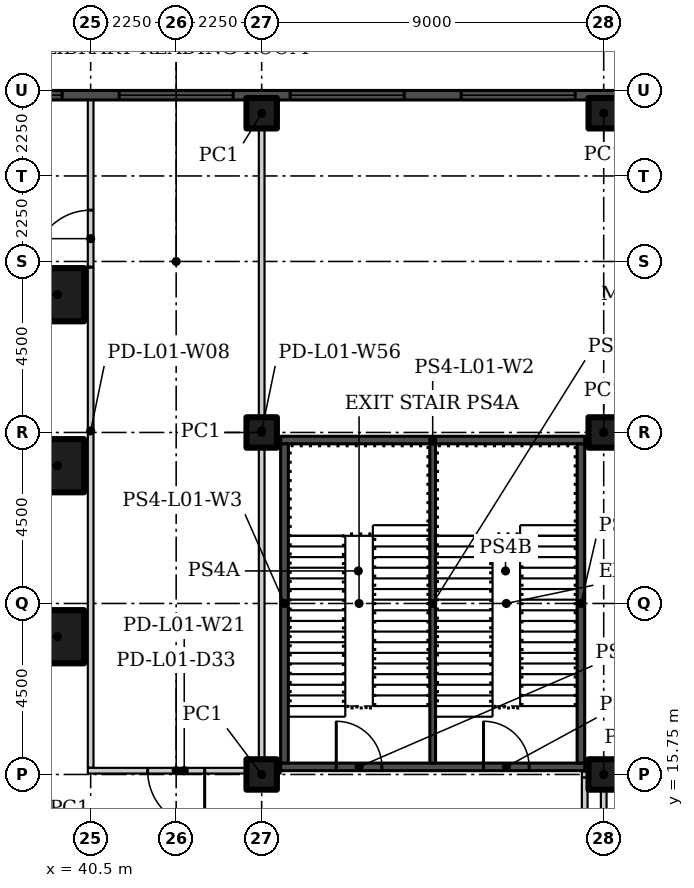
"""IFC4 building model, lengths in metres.
Left out: names, types, materials, properties, quantities, classifications, styles, units other than length and angle.
Written with IfcOpenShell. Run it as: python <this file> out.ifc"""

import sys

from ifc_helpers import new_model, si_unit, direction, frame, frame_2d, origin, origin_2d, place, context, subcontext, project, spatial, rectangle, hollow_rectangle, extrude, element, fill, save


model = new_model("IFC4")
c1 = context("Model", 3, precision=1e-05, world=origin(), true_north=direction((0.0, 1.0)))
c2 = subcontext(c1, "Body", "Model", "MODEL_VIEW")
j1 = project(units=[si_unit("LENGTHUNIT", "METRE"), si_unit("PLANEANGLEUNIT", "RADIAN")], contexts=[c1])
p1 = place(None, origin())
s1 = spatial("IfcSite", under=j1, at=p1, CompositionType="ELEMENT")
p2 = place(p1, origin())
s2 = spatial("IfcBuilding", under=s1, at=p2, CompositionType="ELEMENT")
p3 = place(p2, frame((0.0, 0.0, 6.5)))
s3 = spatial("IfcBuildingStorey", under=s2, at=p3, CompositionType="ELEMENT", Elevation=6.5)
for number, where in (
    (1, (39.625, 19.375, 0.0)),
    (2, (39.625, 23.875, 0.0)),
    (3, (39.625, 28.375, 0.0)),
):
    element("IfcColumn", number, at=place(p3, frame(where)), inside=s3, PredefinedType="COLUMN", context=c2, shape_type="SweptSolid", body=[
        extrude(hollow_rectangle(XDim=1.4, YDim=1.4, WallThickness=0.06, at=origin_2d()), origin(), (0.0, 0.0, 1.0), 5.6),
    ])
for number, where in (
    (4, (45.0, 15.75, 0.0)),
    (5, (45.0, 24.75, 0.0)),
    (6, (45.0, 33.15, 0.0)),
    (7, (54.0, 15.75, 0.0)),
    (8, (54.0, 24.75, 0.0)),
    (9, (54.0, 33.15, 0.0)),
):
    element("IfcColumn", number, at=place(p3, frame(where)), inside=s3, PredefinedType="COLUMN", context=c2, shape_type="SweptSolid", body=[
        extrude(hollow_rectangle(XDim=0.8, YDim=0.8, WallThickness=0.03, at=origin_2d()), origin(), (0.0, 0.0, 1.0), 5.6),
    ])
p4 = place(p3, frame((40.5, 15.925, 0.0), z_axis=(0.0, 0.0, 1.0), x_axis=(0.0, 1.0, 0.0)))
e10 = element("IfcWall", 10, at=p4, inside=s3, PredefinedType="PARTITIONING", context=c2, shape_type="SweptSolid", body=[
    extrude(rectangle(XDim=17.73, YDim=0.15, at=frame_2d((8.865, 0.0))), origin(), (0.0, 0.0, 1.0), 5.6),
])
p5 = place(p4, frame((13.175, 0.0, 0.0)))
e11 = element("IfcOpeningElement", 11, at=p5, cuts=e10, PredefinedType="OPENING", context=c2, shape_type="SweptSolid", body=[
    extrude(rectangle(XDim=1.5, YDim=2.1, at=frame_2d((0.75, 1.05))), frame((0.0, 0.085, 0.0), z_axis=(0.0, -1.0, 0.0), x_axis=(1.0, 0.0, 0.0)), (0.0, 0.0, 1.0), 0.17),
])
p6 = place(p3, frame((45.5, 15.85, 0.0), z_axis=(0.0, 0.0, 1.0), x_axis=(-1.0, 0.0, 0.0)))
e12 = element("IfcWall", 12, at=p6, inside=s3, PredefinedType="PARTITIONING", context=c2, shape_type="SweptSolid", body=[
    extrude(rectangle(XDim=5.075, YDim=0.15, at=frame_2d((2.538, 0.0))), origin(), (0.0, 0.0, 1.0), 5.6),
])
p7 = place(p6, frame((2.0, 0.0, 0.0)))
e13 = element("IfcOpeningElement", 13, at=p7, cuts=e12, PredefinedType="OPENING", context=c2, shape_type="SweptSolid", body=[
    extrude(rectangle(XDim=1.5, YDim=2.1, at=frame_2d((0.75, 1.05))), frame((0.0, 0.085, 0.0), z_axis=(0.0, -1.0, 0.0), x_axis=(1.0, 0.0, 0.0)), (0.0, 0.0, 1.0), 0.17),
])
p8 = place(p3, frame((53.5, 15.675, 0.0), z_axis=(0.0, 0.0, 1.0), x_axis=(0.0, -1.0, 0.0)))
e14 = element("IfcWall", 14, at=p8, inside=s3, PredefinedType="PARTITIONING", context=c2, shape_type="SweptSolid", body=[
    extrude(rectangle(XDim=2.75, YDim=0.15, at=frame_2d((1.375, 0.0))), origin(), (0.0, 0.0, 1.0), 5.6),
])
p9 = place(p3, frame((53.425, 15.75, 0.0)))
e15 = element("IfcWall", 15, at=p9, inside=s3, PredefinedType="PARTITIONING", context=c2, shape_type="SweptSolid", body=[
    extrude(rectangle(XDim=0.65, YDim=0.15, at=frame_2d((0.325, 0.0))), origin(), (0.0, 0.0, 1.0), 5.6),
])
p10 = place(p3, frame((54.0, 15.675, 0.0), z_axis=(0.0, 0.0, 1.0), x_axis=(0.0, -1.0, 0.0)))
e16 = element("IfcWall", 16, at=p10, inside=s3, PredefinedType="PARTITIONING", context=c2, shape_type="SweptSolid", body=[
    extrude(rectangle(XDim=8.85, YDim=0.15, at=frame_2d((4.425, 0.0))), origin(), (0.0, 0.0, 1.0), 5.6),
])
p11 = place(p3, frame((45.0, 33.655, 0.0), z_axis=(0.0, 0.0, 1.0), x_axis=(0.0, -1.0, 0.0)))
e17 = element("IfcWall", 17, at=p11, inside=s3, PredefinedType="PARTITIONING", context=c2, shape_type="SweptSolid", body=[
    extrude(rectangle(XDim=17.73, YDim=0.15, at=frame_2d((8.865, 0.0))), origin(), (0.0, 0.0, 1.0), 5.6),
])
p12 = place(p3, frame((-67.5, 33.625, -0.35)))
e18 = element("IfcWall", 18, at=p12, inside=s3, PredefinedType="SOLIDWALL", context=c2, shape_type="SweptSolid", body=[
    extrude(rectangle(XDim=130.5, YDim=0.25, at=frame_2d((65.25, 0.0))), origin(), (0.0, 0.0, 1.0), 6.0),
])
p13 = place(p12, frame((126.75, 0.0, 1.35)))
e19 = element("IfcOpeningElement", 19, at=p13, cuts=e18, PredefinedType="OPENING", context=c2, shape_type="SweptSolid", body=[
    extrude(rectangle(XDim=3.0, YDim=1.8, at=frame_2d((1.5, 0.9))), frame((0.0, 0.135, 0.0), z_axis=(0.0, -1.0, 0.0), x_axis=(1.0, 0.0, 0.0)), (0.0, 0.0, 1.0), 0.27),
])
p14 = place(p12, frame((122.25, 0.0, 1.35)))
e20 = element("IfcOpeningElement", 20, at=p14, cuts=e18, PredefinedType="OPENING", context=c2, shape_type="SweptSolid", body=[
    extrude(rectangle(XDim=3.0, YDim=1.8, at=frame_2d((1.5, 0.9))), frame((0.0, 0.135, 0.0), z_axis=(0.0, -1.0, 0.0), x_axis=(1.0, 0.0, 0.0)), (0.0, 0.0, 1.0), 0.27),
])
p15 = place(p12, frame((117.75, 0.0, 1.35)))
e21 = element("IfcOpeningElement", 21, at=p15, cuts=e18, PredefinedType="OPENING", context=c2, shape_type="SweptSolid", body=[
    extrude(rectangle(XDim=3.0, YDim=1.8, at=frame_2d((1.5, 0.9))), frame((0.0, 0.135, 0.0), z_axis=(0.0, -1.0, 0.0), x_axis=(1.0, 0.0, 0.0)), (0.0, 0.0, 1.0), 0.27),
])
p16 = place(p12, frame((113.25, 0.0, 1.35)))
e22 = element("IfcOpeningElement", 22, at=p16, cuts=e18, PredefinedType="OPENING", context=c2, shape_type="SweptSolid", body=[
    extrude(rectangle(XDim=3.0, YDim=1.8, at=frame_2d((1.5, 0.9))), frame((0.0, 0.135, 0.0), z_axis=(0.0, -1.0, 0.0), x_axis=(1.0, 0.0, 0.0)), (0.0, 0.0, 1.0), 0.27),
])
p17 = place(p12, frame((108.75, 0.0, 1.35)))
e23 = element("IfcOpeningElement", 23, at=p17, cuts=e18, PredefinedType="OPENING", context=c2, shape_type="SweptSolid", body=[
    extrude(rectangle(XDim=3.0, YDim=1.8, at=frame_2d((1.5, 0.9))), frame((0.0, 0.135, 0.0), z_axis=(0.0, -1.0, 0.0), x_axis=(1.0, 0.0, 0.0)), (0.0, 0.0, 1.0), 0.27),
])
p18 = place(p12, frame((104.25, 0.0, 1.35)))
e24 = element("IfcOpeningElement", 24, at=p18, cuts=e18, PredefinedType="OPENING", context=c2, shape_type="SweptSolid", body=[
    extrude(rectangle(XDim=3.0, YDim=1.8, at=frame_2d((1.5, 0.9))), frame((0.0, 0.135, 0.0), z_axis=(0.0, -1.0, 0.0), x_axis=(1.0, 0.0, 0.0)), (0.0, 0.0, 1.0), 0.27),
])
p19 = place(p12, frame((99.75, 0.0, 1.35)))
e25 = element("IfcOpeningElement", 25, at=p19, cuts=e18, PredefinedType="OPENING", context=c2, shape_type="SweptSolid", body=[
    extrude(rectangle(XDim=3.0, YDim=1.8, at=frame_2d((1.5, 0.9))), frame((0.0, 0.135, 0.0), z_axis=(0.0, -1.0, 0.0), x_axis=(1.0, 0.0, 0.0)), (0.0, 0.0, 1.0), 0.27),
])
p20 = place(p12, frame((95.25, 0.0, 1.35)))
e26 = element("IfcOpeningElement", 26, at=p20, cuts=e18, PredefinedType="OPENING", context=c2, shape_type="SweptSolid", body=[
    extrude(rectangle(XDim=3.0, YDim=1.8, at=frame_2d((1.5, 0.9))), frame((0.0, 0.135, 0.0), z_axis=(0.0, -1.0, 0.0), x_axis=(1.0, 0.0, 0.0)), (0.0, 0.0, 1.0), 0.27),
])
p21 = place(p12, frame((90.75, 0.0, 1.35)))
e27 = element("IfcOpeningElement", 27, at=p21, cuts=e18, PredefinedType="OPENING", context=c2, shape_type="SweptSolid", body=[
    extrude(rectangle(XDim=3.0, YDim=1.8, at=frame_2d((1.5, 0.9))), frame((0.0, 0.135, 0.0), z_axis=(0.0, -1.0, 0.0), x_axis=(1.0, 0.0, 0.0)), (0.0, 0.0, 1.0), 0.27),
])
p22 = place(p12, frame((86.25, 0.0, 1.35)))
e28 = element("IfcOpeningElement", 28, at=p22, cuts=e18, PredefinedType="OPENING", context=c2, shape_type="SweptSolid", body=[
    extrude(rectangle(XDim=3.0, YDim=1.8, at=frame_2d((1.5, 0.9))), frame((0.0, 0.135, 0.0), z_axis=(0.0, -1.0, 0.0), x_axis=(1.0, 0.0, 0.0)), (0.0, 0.0, 1.0), 0.27),
])
p23 = place(p12, frame((81.75, 0.0, 1.35)))
e29 = element("IfcOpeningElement", 29, at=p23, cuts=e18, PredefinedType="OPENING", context=c2, shape_type="SweptSolid", body=[
    extrude(rectangle(XDim=3.0, YDim=1.8, at=frame_2d((1.5, 0.9))), frame((0.0, 0.135, 0.0), z_axis=(0.0, -1.0, 0.0), x_axis=(1.0, 0.0, 0.0)), (0.0, 0.0, 1.0), 0.27),
])
p24 = place(p12, frame((77.25, 0.0, 1.35)))
e30 = element("IfcOpeningElement", 30, at=p24, cuts=e18, PredefinedType="OPENING", context=c2, shape_type="SweptSolid", body=[
    extrude(rectangle(XDim=3.0, YDim=1.8, at=frame_2d((1.5, 0.9))), frame((0.0, 0.135, 0.0), z_axis=(0.0, -1.0, 0.0), x_axis=(1.0, 0.0, 0.0)), (0.0, 0.0, 1.0), 0.27),
])
p25 = place(p12, frame((72.75, 0.0, 1.35)))
e31 = element("IfcOpeningElement", 31, at=p25, cuts=e18, PredefinedType="OPENING", context=c2, shape_type="SweptSolid", body=[
    extrude(rectangle(XDim=3.0, YDim=1.8, at=frame_2d((1.5, 0.9))), frame((0.0, 0.135, 0.0), z_axis=(0.0, -1.0, 0.0), x_axis=(1.0, 0.0, 0.0)), (0.0, 0.0, 1.0), 0.27),
])
p26 = place(p12, frame((68.25, 0.0, 1.35)))
e32 = element("IfcOpeningElement", 32, at=p26, cuts=e18, PredefinedType="OPENING", context=c2, shape_type="SweptSolid", body=[
    extrude(rectangle(XDim=3.0, YDim=1.8, at=frame_2d((1.5, 0.9))), frame((0.0, 0.135, 0.0), z_axis=(0.0, -1.0, 0.0), x_axis=(1.0, 0.0, 0.0)), (0.0, 0.0, 1.0), 0.27),
])
p27 = place(p12, frame((63.75, 0.0, 1.35)))
e33 = element("IfcOpeningElement", 33, at=p27, cuts=e18, PredefinedType="OPENING", context=c2, shape_type="SweptSolid", body=[
    extrude(rectangle(XDim=3.0, YDim=1.8, at=frame_2d((1.5, 0.9))), frame((0.0, 0.135, 0.0), z_axis=(0.0, -1.0, 0.0), x_axis=(1.0, 0.0, 0.0)), (0.0, 0.0, 1.0), 0.27),
])
p28 = place(p12, frame((59.25, 0.0, 1.35)))
e34 = element("IfcOpeningElement", 34, at=p28, cuts=e18, PredefinedType="OPENING", context=c2, shape_type="SweptSolid", body=[
    extrude(rectangle(XDim=3.0, YDim=1.8, at=frame_2d((1.5, 0.9))), frame((0.0, 0.135, 0.0), z_axis=(0.0, -1.0, 0.0), x_axis=(1.0, 0.0, 0.0)), (0.0, 0.0, 1.0), 0.27),
])
p29 = place(p12, frame((54.75, 0.0, 1.35)))
e35 = element("IfcOpeningElement", 35, at=p29, cuts=e18, PredefinedType="OPENING", context=c2, shape_type="SweptSolid", body=[
    extrude(rectangle(XDim=3.0, YDim=1.8, at=frame_2d((1.5, 0.9))), frame((0.0, 0.135, 0.0), z_axis=(0.0, -1.0, 0.0), x_axis=(1.0, 0.0, 0.0)), (0.0, 0.0, 1.0), 0.27),
])
p30 = place(p12, frame((50.25, 0.0, 1.35)))
e36 = element("IfcOpeningElement", 36, at=p30, cuts=e18, PredefinedType="OPENING", context=c2, shape_type="SweptSolid", body=[
    extrude(rectangle(XDim=3.0, YDim=1.8, at=frame_2d((1.5, 0.9))), frame((0.0, 0.135, 0.0), z_axis=(0.0, -1.0, 0.0), x_axis=(1.0, 0.0, 0.0)), (0.0, 0.0, 1.0), 0.27),
])
p31 = place(p12, frame((45.75, 0.0, 1.35)))
e37 = element("IfcOpeningElement", 37, at=p31, cuts=e18, PredefinedType="OPENING", context=c2, shape_type="SweptSolid", body=[
    extrude(rectangle(XDim=3.0, YDim=1.8, at=frame_2d((1.5, 0.9))), frame((0.0, 0.135, 0.0), z_axis=(0.0, -1.0, 0.0), x_axis=(1.0, 0.0, 0.0)), (0.0, 0.0, 1.0), 0.27),
])
p32 = place(p12, frame((41.25, 0.0, 1.35)))
e38 = element("IfcOpeningElement", 38, at=p32, cuts=e18, PredefinedType="OPENING", context=c2, shape_type="SweptSolid", body=[
    extrude(rectangle(XDim=3.0, YDim=1.8, at=frame_2d((1.5, 0.9))), frame((0.0, 0.135, 0.0), z_axis=(0.0, -1.0, 0.0), x_axis=(1.0, 0.0, 0.0)), (0.0, 0.0, 1.0), 0.27),
])
p33 = place(p12, frame((36.75, 0.0, 1.35)))
e39 = element("IfcOpeningElement", 39, at=p33, cuts=e18, PredefinedType="OPENING", context=c2, shape_type="SweptSolid", body=[
    extrude(rectangle(XDim=3.0, YDim=1.8, at=frame_2d((1.5, 0.9))), frame((0.0, 0.135, 0.0), z_axis=(0.0, -1.0, 0.0), x_axis=(1.0, 0.0, 0.0)), (0.0, 0.0, 1.0), 0.27),
])
p34 = place(p12, frame((32.25, 0.0, 1.35)))
e40 = element("IfcOpeningElement", 40, at=p34, cuts=e18, PredefinedType="OPENING", context=c2, shape_type="SweptSolid", body=[
    extrude(rectangle(XDim=3.0, YDim=1.8, at=frame_2d((1.5, 0.9))), frame((0.0, 0.135, 0.0), z_axis=(0.0, -1.0, 0.0), x_axis=(1.0, 0.0, 0.0)), (0.0, 0.0, 1.0), 0.27),
])
p35 = place(p12, frame((27.75, 0.0, 1.35)))
e41 = element("IfcOpeningElement", 41, at=p35, cuts=e18, PredefinedType="OPENING", context=c2, shape_type="SweptSolid", body=[
    extrude(rectangle(XDim=3.0, YDim=1.8, at=frame_2d((1.5, 0.9))), frame((0.0, 0.135, 0.0), z_axis=(0.0, -1.0, 0.0), x_axis=(1.0, 0.0, 0.0)), (0.0, 0.0, 1.0), 0.27),
])
p36 = place(p12, frame((23.25, 0.0, 1.35)))
e42 = element("IfcOpeningElement", 42, at=p36, cuts=e18, PredefinedType="OPENING", context=c2, shape_type="SweptSolid", body=[
    extrude(rectangle(XDim=3.0, YDim=1.8, at=frame_2d((1.5, 0.9))), frame((0.0, 0.135, 0.0), z_axis=(0.0, -1.0, 0.0), x_axis=(1.0, 0.0, 0.0)), (0.0, 0.0, 1.0), 0.27),
])
p37 = place(p12, frame((18.75, 0.0, 1.35)))
e43 = element("IfcOpeningElement", 43, at=p37, cuts=e18, PredefinedType="OPENING", context=c2, shape_type="SweptSolid", body=[
    extrude(rectangle(XDim=3.0, YDim=1.8, at=frame_2d((1.5, 0.9))), frame((0.0, 0.135, 0.0), z_axis=(0.0, -1.0, 0.0), x_axis=(1.0, 0.0, 0.0)), (0.0, 0.0, 1.0), 0.27),
])
p38 = place(p12, frame((14.25, 0.0, 1.35)))
e44 = element("IfcOpeningElement", 44, at=p38, cuts=e18, PredefinedType="OPENING", context=c2, shape_type="SweptSolid", body=[
    extrude(rectangle(XDim=3.0, YDim=1.8, at=frame_2d((1.5, 0.9))), frame((0.0, 0.135, 0.0), z_axis=(0.0, -1.0, 0.0), x_axis=(1.0, 0.0, 0.0)), (0.0, 0.0, 1.0), 0.27),
])
p39 = place(p12, frame((9.75, 0.0, 1.35)))
e45 = element("IfcOpeningElement", 45, at=p39, cuts=e18, PredefinedType="OPENING", context=c2, shape_type="SweptSolid", body=[
    extrude(rectangle(XDim=3.0, YDim=1.8, at=frame_2d((1.5, 0.9))), frame((0.0, 0.135, 0.0), z_axis=(0.0, -1.0, 0.0), x_axis=(1.0, 0.0, 0.0)), (0.0, 0.0, 1.0), 0.27),
])
p40 = place(p12, frame((5.25, 0.0, 1.35)))
e46 = element("IfcOpeningElement", 46, at=p40, cuts=e18, PredefinedType="OPENING", context=c2, shape_type="SweptSolid", body=[
    extrude(rectangle(XDim=3.0, YDim=1.8, at=frame_2d((1.5, 0.9))), frame((0.0, 0.135, 0.0), z_axis=(0.0, -1.0, 0.0), x_axis=(1.0, 0.0, 0.0)), (0.0, 0.0, 1.0), 0.27),
])
p41 = place(p12, frame((0.75, 0.0, 1.35)))
e47 = element("IfcOpeningElement", 47, at=p41, cuts=e18, PredefinedType="OPENING", context=c2, shape_type="SweptSolid", body=[
    extrude(rectangle(XDim=3.0, YDim=1.8, at=frame_2d((1.5, 0.9))), frame((0.0, 0.135, 0.0), z_axis=(0.0, -1.0, 0.0), x_axis=(1.0, 0.0, 0.0)), (0.0, 0.0, 1.0), 0.27),
])
p42 = place(p3, frame((45.5, 15.95, 0.0)))
e48 = element("IfcWall", 48, at=p42, inside=s3, PredefinedType="SHEAR", context=c2, shape_type="SweptSolid", body=[
    extrude(rectangle(XDim=8.0, YDim=0.2, at=frame_2d((4.0, 0.0))), origin(), (0.0, 0.0, 1.0), 5.6),
])
p43 = place(p42, frame((1.462, 0.0, 0.0)))
e49 = element("IfcOpeningElement", 49, at=p43, cuts=e48, PredefinedType="OPENING", context=c2, shape_type="SweptSolid", body=[
    extrude(rectangle(XDim=1.2, YDim=2.4, at=frame_2d((0.6, 1.2))), frame((0.0, 0.11, 0.0), z_axis=(0.0, -1.0, 0.0), x_axis=(1.0, 0.0, 0.0)), (0.0, 0.0, 1.0), 0.22),
])
p44 = place(p42, frame((5.337, 0.0, 0.0)))
e50 = element("IfcOpeningElement", 50, at=p44, cuts=e48, PredefinedType="OPENING", context=c2, shape_type="SweptSolid", body=[
    extrude(rectangle(XDim=1.2, YDim=2.4, at=frame_2d((0.6, 1.2))), frame((0.0, 0.11, 0.0), z_axis=(0.0, -1.0, 0.0), x_axis=(1.0, 0.0, 0.0)), (0.0, 0.0, 1.0), 0.22),
])
p45 = place(p3, frame((45.5, 24.55, 0.0)))
e51 = element("IfcWall", 51, at=p45, inside=s3, PredefinedType="SHEAR", context=c2, shape_type="SweptSolid", body=[
    extrude(rectangle(XDim=8.0, YDim=0.2, at=frame_2d((4.0, 0.0))), origin(), (0.0, 0.0, 1.0), 5.6),
])
for number, where, z_axis, x_axis in (
    (52, (45.6, 16.05, 0.0), (0.0, 0.0, 1.0), (0.0, 1.0, 0.0)),
    (53, (53.4, 16.05, 0.0), (0.0, 0.0, 1.0), (0.0, 1.0, 0.0)),
):
    element("IfcWall", number, at=place(p3, frame(where, z_axis=z_axis, x_axis=x_axis)), inside=s3, PredefinedType="SHEAR", context=c2, shape_type="SweptSolid", body=[
        extrude(rectangle(XDim=8.4, YDim=0.2, at=frame_2d((4.2, 0.0))), origin(), (0.0, 0.0, 1.0), 5.6),
    ])
p46 = place(p3, frame((49.5, 16.05, 0.0), z_axis=(0.0, 0.0, 1.0), x_axis=(0.0, 1.0, 0.0)))
e54 = element("IfcWall", 54, at=p46, inside=s3, PredefinedType="SHEAR", context=c2, shape_type="SweptSolid", body=[
    extrude(rectangle(XDim=8.4, YDim=0.15, at=frame_2d((4.2, 0.0))), origin(), (0.0, 0.0, 1.0), 5.6),
])
p47 = place(p5, origin())
e55 = element("IfcDoor", 55, at=p47, inside=s3, OperationType="DOUBLE_DOOR_SINGLE_SWING", PredefinedType="DOOR", context=c2, shape_type="SweptSolid", body=[
    extrude(rectangle(XDim=1.5, YDim=2.1, at=frame_2d((0.75, 1.05))), frame((0.0, 0.025, 0.0), z_axis=(0.0, -1.0, 0.0), x_axis=(1.0, 0.0, 0.0)), (0.0, 0.0, 1.0), 0.05),
])
fill(e11, e55)
p48 = place(p7, origin())
e56 = element("IfcDoor", 56, at=p48, inside=s3, OperationType="DOUBLE_DOOR_SINGLE_SWING", PredefinedType="DOOR", context=c2, shape_type="SweptSolid", body=[
    extrude(rectangle(XDim=1.5, YDim=2.1, at=frame_2d((0.75, 1.05))), frame((0.0, 0.025, 0.0), z_axis=(0.0, -1.0, 0.0), x_axis=(1.0, 0.0, 0.0)), (0.0, 0.0, 1.0), 0.05),
])
fill(e13, e56)
p49 = place(p15, origin())
e57 = element("IfcWindow", 57, at=p49, inside=s3, PartitioningType="TRIPLE_PANEL_VERTICAL", PredefinedType="WINDOW", context=c2, shape_type="SweptSolid", body=[
    extrude(rectangle(XDim=3.0, YDim=1.8, at=frame_2d((1.5, 0.9))), frame((0.0, 0.03, 0.0), z_axis=(0.0, -1.0, 0.0), x_axis=(1.0, 0.0, 0.0)), (0.0, 0.0, 1.0), 0.06),
])
fill(e21, e57)
p50 = place(p16, origin())
e58 = element("IfcWindow", 58, at=p50, inside=s3, PartitioningType="TRIPLE_PANEL_VERTICAL", PredefinedType="WINDOW", context=c2, shape_type="SweptSolid", body=[
    extrude(rectangle(XDim=3.0, YDim=1.8, at=frame_2d((1.5, 0.9))), frame((0.0, 0.03, 0.0), z_axis=(0.0, -1.0, 0.0), x_axis=(1.0, 0.0, 0.0)), (0.0, 0.0, 1.0), 0.06),
])
fill(e22, e58)
p51 = place(p17, origin())
e59 = element("IfcWindow", 59, at=p51, inside=s3, PartitioningType="TRIPLE_PANEL_VERTICAL", PredefinedType="WINDOW", context=c2, shape_type="SweptSolid", body=[
    extrude(rectangle(XDim=3.0, YDim=1.8, at=frame_2d((1.5, 0.9))), frame((0.0, 0.03, 0.0), z_axis=(0.0, -1.0, 0.0), x_axis=(1.0, 0.0, 0.0)), (0.0, 0.0, 1.0), 0.06),
])
fill(e23, e59)
p52 = place(p18, origin())
e60 = element("IfcWindow", 60, at=p52, inside=s3, PartitioningType="TRIPLE_PANEL_VERTICAL", PredefinedType="WINDOW", context=c2, shape_type="SweptSolid", body=[
    extrude(rectangle(XDim=3.0, YDim=1.8, at=frame_2d((1.5, 0.9))), frame((0.0, 0.03, 0.0), z_axis=(0.0, -1.0, 0.0), x_axis=(1.0, 0.0, 0.0)), (0.0, 0.0, 1.0), 0.06),
])
fill(e24, e60)
p53 = place(p43, origin())
e61 = element("IfcDoor", 61, at=p53, inside=s3, OperationType="SINGLE_SWING_LEFT", PredefinedType="DOOR", context=c2, shape_type="SweptSolid", body=[
    extrude(rectangle(XDim=1.2, YDim=2.4, at=frame_2d((0.6, 1.2))), frame((0.0, 0.025, 0.0), z_axis=(0.0, -1.0, 0.0), x_axis=(1.0, 0.0, 0.0)), (0.0, 0.0, 1.0), 0.05),
])
fill(e49, e61)
p54 = place(p44, origin())
e62 = element("IfcDoor", 62, at=p54, inside=s3, OperationType="SINGLE_SWING_RIGHT", PredefinedType="DOOR", context=c2, shape_type="SweptSolid", body=[
    extrude(rectangle(XDim=1.2, YDim=2.4, at=frame_2d((0.6, 1.2))), frame((0.0, 0.025, 0.0), z_axis=(0.0, -1.0, 0.0), x_axis=(1.0, 0.0, 0.0)), (0.0, 0.0, 1.0), 0.05),
])
fill(e50, e62)
save(model, sys.argv[1])
